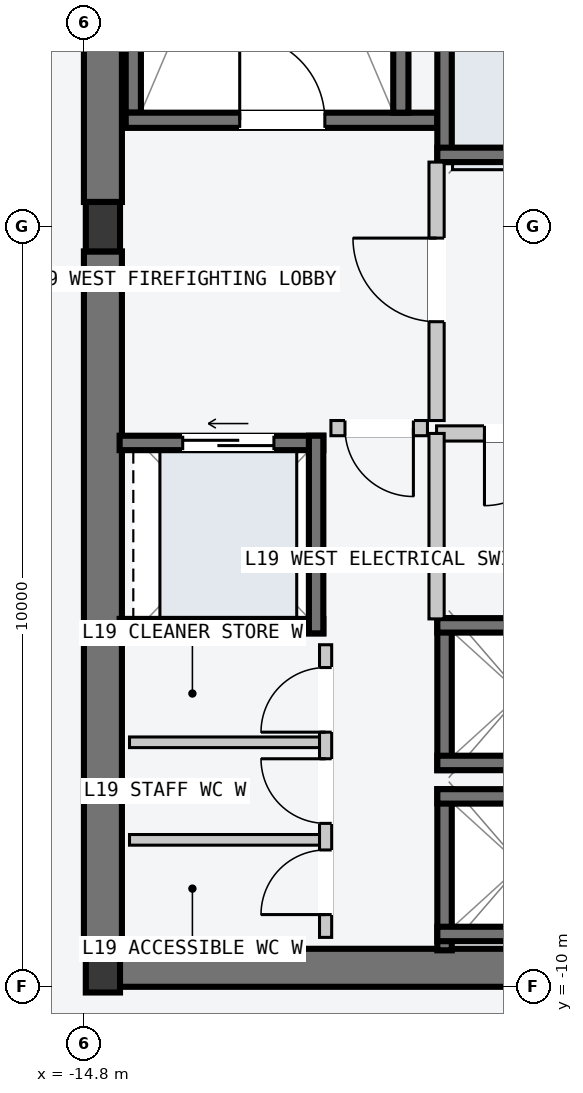
"""IFC4 building model, lengths in metres.
Left out: names, types, materials, properties, quantities, classifications, styles, units other than length and angle.
Written with IfcOpenShell. Run it as: python <this file> out.ifc"""

import sys

from ifc_helpers import new_model, si_unit, direction, frame, frame_2d, origin, origin_2d, place, context, subcontext, project, spatial, rectangle, i_section, extrude, element, fill, save


model = new_model("IFC4")
c1 = context("Model", 3, precision=1e-05, world=origin(), true_north=direction((0.0, 1.0)))
c2 = subcontext(c1, "Body", "Model", "MODEL_VIEW")
j1 = project(units=[si_unit("LENGTHUNIT", "METRE"), si_unit("PLANEANGLEUNIT", "RADIAN")], contexts=[c1])
p1 = place(None, origin())
s1 = spatial("IfcSite", under=j1, at=p1, CompositionType="ELEMENT")
p2 = place(p1, origin())
s2 = spatial("IfcBuilding", under=s1, at=p2, CompositionType="ELEMENT")
p3 = place(p2, frame((0.0, 0.0, 74.4)))
s3 = spatial("IfcBuildingStorey", under=s2, at=p3, CompositionType="ELEMENT", Elevation=74.4)
p4 = place(p3, frame((-14.53, -9.75, -0.2), z_axis=(0.0, 0.0, 1.0), x_axis=(1.0, 0.0, 0.0)))
e1 = element("IfcWall", 1, at=p4, inside=s3, PredefinedType="SHEAR", context=c2, shape_type="SweptSolid", body=[
    extrude(rectangle(XDim=6.46, YDim=0.5, at=frame_2d((3.23, 0.0))), origin(), (0.0, 0.0, 1.0), 3.6),
])
for number, where, z_axis, x_axis in (
    (2, (-14.55, -9.425, -0.2), (0.0, 0.0, 1.0), (0.0, 1.0, 0.0)),
    (3, (-14.55, 0.325, -0.2), (0.0, 0.0, 1.0), (0.0, 1.0, 0.0)),
):
    element("IfcWall", number, at=place(p3, frame(where, z_axis=z_axis, x_axis=x_axis)), inside=s3, PredefinedType="SHEAR", context=c2, shape_type="SweptSolid", body=[
        extrude(rectangle(XDim=9.1, YDim=0.5, at=frame_2d((4.55, 0.0))), origin(), (0.0, 0.0, 1.0), 3.6),
    ])
p5 = place(p3, frame((-14.15, 1.5, -0.2), z_axis=(0.0, 0.0, 1.0), x_axis=(0.0, 1.0, 0.0)))
e4 = element("IfcWall", 4, at=p5, inside=s3, PredefinedType="SOLIDWALL", context=c2, shape_type="SweptSolid", body=[
    extrude(rectangle(XDim=7.8, YDim=0.2, at=frame_2d((3.9, 0.0))), origin(), (0.0, 0.0, 1.0), 3.6),
])
p6 = place(p3, frame((-14.25, 1.4, -0.2), z_axis=(0.0, 0.0, 1.0), x_axis=(1.0, 0.0, 0.0)))
e5 = element("IfcWall", 5, at=p6, inside=s3, PredefinedType="SOLIDWALL", context=c2, shape_type="SweptSolid", body=[
    extrude(rectangle(XDim=4.1, YDim=0.2, at=frame_2d((2.05, 0.0))), origin(), (0.0, 0.0, 1.0), 3.6),
])
p7 = place(p6, frame((1.5, 0.0, 0.2)))
e6 = element("IfcOpeningElement", 6, at=p7, cuts=e5, PredefinedType="OPENING", context=c2, shape_type="SweptSolid", body=[
    extrude(rectangle(XDim=1.12, YDim=2.18, at=frame_2d((0.56, 1.09))), frame((0.0, 0.11, 0.0), z_axis=(0.0, -1.0, 0.0), x_axis=(1.0, 0.0, 0.0)), (0.0, 0.0, 1.0), 0.22),
])
p8 = place(p3, frame((-10.63, 1.5, -0.2), z_axis=(0.0, 0.0, 1.0), x_axis=(0.0, 1.0, 0.0)))
e7 = element("IfcWall", 7, at=p8, inside=s3, PredefinedType="SOLIDWALL", context=c2, shape_type="SweptSolid", body=[
    extrude(rectangle(XDim=7.8, YDim=0.2, at=frame_2d((3.9, 0.0))), origin(), (0.0, 0.0, 1.0), 3.6),
])
for number, where, z_axis, x_axis in (
    (8, (-14.55, -9.75, 0.0), (0.0, 0.0, 1.0), (1.0, 0.0, 0.0)),
    (9, (-14.55, 0.0, 0.0), (0.0, 0.0, 1.0), (1.0, 0.0, 0.0)),
):
    element("IfcColumn", number, at=place(p3, frame(where, z_axis=z_axis, x_axis=x_axis)), inside=s3, PredefinedType="COLUMN", context=c2, shape_type="SweptSolid", body=[
        extrude(i_section(OverallWidth=0.45, OverallDepth=0.65, WebThickness=0.025, FlangeThickness=0.04, at=origin_2d()), origin(), (0.0, 0.0, 1.0), 3.6),
    ])
p9 = place(p3, frame((-10.055, 0.85, -0.2), z_axis=(0.0, 0.0, 1.0), x_axis=(0.0, 1.0, 0.0)))
e10 = element("IfcWall", 10, at=p9, inside=s3, PredefinedType="SOLIDWALL", context=c2, shape_type="SweptSolid", body=[
    extrude(rectangle(XDim=1.9, YDim=0.19, at=frame_2d((0.95, 0.0))), origin(), (0.0, 0.0, 1.0), 3.6),
])
p10 = place(p3, frame((-10.15, 0.945, -0.2), z_axis=(0.0, 0.0, 1.0), x_axis=(1.0, 0.0, 0.0)))
e11 = element("IfcWall", 11, at=p10, inside=s3, PredefinedType="SOLIDWALL", context=c2, shape_type="SweptSolid", body=[
    extrude(rectangle(XDim=2.2, YDim=0.19, at=frame_2d((1.1, 0.0))), origin(), (0.0, 0.0, 1.0), 3.6),
])
p11 = place(p3, frame((-10.055, -9.52, -0.2), z_axis=(0.0, 0.0, 1.0), x_axis=(0.0, 1.0, 0.0)))
e12 = element("IfcWall", 12, at=p11, inside=s3, PredefinedType="SOLIDWALL", context=c2, shape_type="SweptSolid", body=[
    extrude(rectangle(XDim=2.12, YDim=0.19, at=frame_2d((1.06, 0.0))), origin(), (0.0, 0.0, 1.0), 3.6),
])
for number, where, z_axis, x_axis in (
    (13, (-10.15, -7.495, -0.2), (0.0, 0.0, 1.0), (1.0, 0.0, 0.0)),
    (14, (-10.15, -9.305, -0.2), (0.0, 0.0, 1.0), (1.0, 0.0, 0.0)),
):
    element("IfcWall", number, at=place(p3, frame(where, z_axis=z_axis, x_axis=x_axis)), inside=s3, PredefinedType="SOLIDWALL", context=c2, shape_type="SweptSolid", body=[
        extrude(rectangle(XDim=2.2, YDim=0.19, at=frame_2d((1.1, 0.0))), origin(), (0.0, 0.0, 1.0), 3.6),
    ])
p12 = place(p3, frame((-10.055, -7.15, -0.2), z_axis=(0.0, 0.0, 1.0), x_axis=(0.0, 1.0, 0.0)))
e15 = element("IfcWall", 15, at=p12, inside=s3, PredefinedType="SOLIDWALL", context=c2, shape_type="SweptSolid", body=[
    extrude(rectangle(XDim=2.0, YDim=0.19, at=frame_2d((1.0, 0.0))), origin(), (0.0, 0.0, 1.0), 3.6),
])
for number, where, z_axis, x_axis in (
    (16, (-10.15, -5.245, -0.2), (0.0, 0.0, 1.0), (1.0, 0.0, 0.0)),
    (17, (-10.15, -7.055, -0.2), (0.0, 0.0, 1.0), (1.0, 0.0, 0.0)),
):
    element("IfcWall", number, at=place(p3, frame(where, z_axis=z_axis, x_axis=x_axis)), inside=s3, PredefinedType="SOLIDWALL", context=c2, shape_type="SweptSolid", body=[
        extrude(rectangle(XDim=2.2, YDim=0.19, at=frame_2d((1.1, 0.0))), origin(), (0.0, 0.0, 1.0), 3.6),
    ])
p13 = place(p3, frame((-14.33, -2.845, -0.2), z_axis=(0.0, 0.0, 1.0), x_axis=(1.0, 0.0, 0.0)))
e18 = element("IfcWall", 18, at=p13, inside=s3, PredefinedType="SOLIDWALL", context=c2, shape_type="SweptSolid", body=[
    extrude(rectangle(XDim=2.68, YDim=0.19, at=frame_2d((1.34, 0.0))), origin(), (0.0, 0.0, 1.0), 3.6),
])
p14 = place(p13, frame((0.83, 0.0, 0.2)))
e19 = element("IfcOpeningElement", 19, at=p14, cuts=e18, PredefinedType="OPENING", context=c2, shape_type="SweptSolid", body=[
    extrude(rectangle(XDim=1.2, YDim=2.2, at=frame_2d((0.6, 1.1))), frame((0.0, 0.105, 0.0), z_axis=(0.0, -1.0, 0.0), x_axis=(1.0, 0.0, 0.0)), (0.0, 0.0, 1.0), 0.21),
])
p15 = place(p3, frame((-14.33, -5.255, -0.2), z_axis=(0.0, 0.0, 1.0), x_axis=(1.0, 0.0, 0.0)))
e20 = element("IfcWall", 20, at=p15, inside=s3, PredefinedType="SOLIDWALL", context=c2, shape_type="SweptSolid", body=[
    extrude(rectangle(XDim=2.68, YDim=0.19, at=frame_2d((1.34, 0.0))), origin(), (0.0, 0.0, 1.0), 3.6),
])
p16 = place(p3, frame((-11.745, -5.35, -0.2), z_axis=(0.0, 0.0, 1.0), x_axis=(0.0, 1.0, 0.0)))
e21 = element("IfcWall", 21, at=p16, inside=s3, PredefinedType="SOLIDWALL", context=c2, shape_type="SweptSolid", body=[
    extrude(rectangle(XDim=2.6, YDim=0.19, at=frame_2d((1.3, 0.0))), origin(), (0.0, 0.0, 1.0), 3.6),
])
p17 = place(p3, frame((-10.16, -2.55, 0.0), z_axis=(0.0, 0.0, 1.0), x_axis=(0.0, 1.0, 0.0)))
e22 = element("IfcWall", 22, at=p17, inside=s3, PredefinedType="PARTITIONING", context=c2, shape_type="SweptSolid", body=[
    extrude(rectangle(XDim=3.4, YDim=0.2, at=frame_2d((1.7, 0.0))), origin(), (0.0, 0.0, 1.0), 3.4),
])
p18 = place(p17, frame((1.3, 0.0, 0.0)))
e23 = element("IfcOpeningElement", 23, at=p18, cuts=e22, PredefinedType="OPENING", context=c2, shape_type="SweptSolid", body=[
    extrude(rectangle(XDim=1.1, YDim=2.15, at=frame_2d((0.55, 1.075))), frame((0.0, 0.11, 0.0), z_axis=(0.0, -1.0, 0.0), x_axis=(1.0, 0.0, 0.0)), (0.0, 0.0, 1.0), 0.22),
])
p19 = place(p3, frame((-10.28, -2.65, 0.0), z_axis=(0.0, 0.0, 1.0), x_axis=(-1.0, 0.0, 0.0)))
e24 = element("IfcWall", 24, at=p19, inside=s3, PredefinedType="PARTITIONING", context=c2, shape_type="SweptSolid", body=[
    extrude(rectangle(XDim=1.27, YDim=0.2, at=frame_2d((0.635, 0.0))), origin(), (0.0, 0.0, 1.0), 3.4),
])
p20 = place(p19, frame((0.185, 0.0, 0.0)))
e25 = element("IfcOpeningElement", 25, at=p20, cuts=e24, PredefinedType="OPENING", context=c2, shape_type="SweptSolid", body=[
    extrude(rectangle(XDim=0.9, YDim=2.15, at=frame_2d((0.45, 1.075))), frame((0.0, 0.11, 0.0), z_axis=(0.0, -1.0, 0.0), x_axis=(1.0, 0.0, 0.0)), (0.0, 0.0, 1.0), 0.22),
])
p21 = place(p3, frame((-7.96, -2.72, 0.0), z_axis=(0.0, 0.0, 1.0), x_axis=(-1.0, 0.0, 0.0)))
e26 = element("IfcWall", 26, at=p21, inside=s3, PredefinedType="PARTITIONING", context=c2, shape_type="SweptSolid", body=[
    extrude(rectangle(XDim=2.2, YDim=0.2, at=frame_2d((1.1, 0.0))), origin(), (0.0, 0.0, 1.0), 3.4),
])
p22 = place(p21, frame((0.62, 0.0, 0.0)))
e27 = element("IfcOpeningElement", 27, at=p22, cuts=e26, PredefinedType="OPENING", context=c2, shape_type="SweptSolid", body=[
    extrude(rectangle(XDim=0.95, YDim=2.1, at=frame_2d((0.475, 1.05))), frame((0.0, 0.11, 0.0), z_axis=(0.0, -1.0, 0.0), x_axis=(1.0, 0.0, 0.0)), (0.0, 0.0, 1.0), 0.22),
])
p23 = place(p3, frame((-10.16, -5.16, 0.0), z_axis=(0.0, 0.0, 1.0), x_axis=(0.0, 1.0, 0.0)))
e28 = element("IfcWall", 28, at=p23, inside=s3, PredefinedType="PARTITIONING", context=c2, shape_type="SweptSolid", body=[
    extrude(rectangle(XDim=2.44, YDim=0.2, at=frame_2d((1.22, 0.0))), origin(), (0.0, 0.0, 1.0), 3.4),
])
for number, where, z_axis, x_axis in (
    (29, (-11.7, -8.067, 0.0), (0.0, 0.0, 1.0), (-1.0, 0.0, 0.0)),
    (30, (-11.7, -6.783, 0.0), (0.0, 0.0, 1.0), (-1.0, 0.0, 0.0)),
):
    element("IfcWall", number, at=place(p3, frame(where, z_axis=z_axis, x_axis=x_axis)), inside=s3, PredefinedType="PARTITIONING", context=c2, shape_type="SweptSolid", body=[
        extrude(rectangle(XDim=2.5, YDim=0.14, at=frame_2d((1.25, 0.0))), origin(), (0.0, 0.0, 1.0), 3.4),
    ])
p24 = place(p3, frame((-11.62, -9.35, 0.0), z_axis=(0.0, 0.0, 1.0), x_axis=(0.0, 1.0, 0.0)))
e31 = element("IfcWall", 31, at=p24, inside=s3, PredefinedType="PARTITIONING", context=c2, shape_type="SweptSolid", body=[
    extrude(rectangle(XDim=3.85, YDim=0.16, at=frame_2d((1.925, 0.0))), origin(), (0.0, 0.0, 1.0), 3.4),
])
p25 = place(p24, frame((0.3, 0.0, 0.0)))
e32 = element("IfcOpeningElement", 32, at=p25, cuts=e31, PredefinedType="OPENING", context=c2, shape_type="SweptSolid", body=[
    extrude(rectangle(XDim=0.85, YDim=2.12, at=frame_2d((0.425, 1.06))), frame((0.0, 0.09, 0.0), z_axis=(0.0, -1.0, 0.0), x_axis=(1.0, 0.0, 0.0)), (0.0, 0.0, 1.0), 0.18),
])
p26 = place(p24, frame((1.5, 0.0, 0.0)))
e33 = element("IfcOpeningElement", 33, at=p26, cuts=e31, PredefinedType="OPENING", context=c2, shape_type="SweptSolid", body=[
    extrude(rectangle(XDim=0.85, YDim=2.12, at=frame_2d((0.425, 1.06))), frame((0.0, 0.09, 0.0), z_axis=(0.0, -1.0, 0.0), x_axis=(1.0, 0.0, 0.0)), (0.0, 0.0, 1.0), 0.18),
])
p27 = place(p24, frame((2.7, 0.0, 0.0)))
e34 = element("IfcOpeningElement", 34, at=p27, cuts=e31, PredefinedType="OPENING", context=c2, shape_type="SweptSolid", body=[
    extrude(rectangle(XDim=0.85, YDim=2.12, at=frame_2d((0.425, 1.06))), frame((0.0, 0.09, 0.0), z_axis=(0.0, -1.0, 0.0), x_axis=(1.0, 0.0, 0.0)), (0.0, 0.0, 1.0), 0.18),
])
p28 = place(p7, origin())
e35 = element("IfcDoor", 35, at=p28, inside=s3, OperationType="SINGLE_SWING_LEFT", PredefinedType="DOOR", context=c2, shape_type="SweptSolid", body=[
    extrude(rectangle(XDim=1.12, YDim=2.18, at=frame_2d((0.56, 1.09))), frame((0.0, 0.025, 0.0), z_axis=(0.0, -1.0, 0.0), x_axis=(1.0, 0.0, 0.0)), (0.0, 0.0, 1.0), 0.05),
])
fill(e6, e35)
p29 = place(p14, origin())
e36 = element("IfcDoor", 36, at=p29, inside=s3, OperationType="SLIDING_TO_LEFT", PredefinedType="DOOR", context=c2, shape_type="SweptSolid", body=[
    extrude(rectangle(XDim=1.2, YDim=2.2, at=frame_2d((0.6, 1.1))), frame((0.0, 0.025, 0.0), z_axis=(0.0, -1.0, 0.0), x_axis=(1.0, 0.0, 0.0)), (0.0, 0.0, 1.0), 0.05),
])
fill(e19, e36)
p30 = place(p18, origin())
e37 = element("IfcDoor", 37, at=p30, inside=s3, OperationType="SINGLE_SWING_RIGHT", PredefinedType="DOOR", context=c2, shape_type="SweptSolid", body=[
    extrude(rectangle(XDim=1.1, YDim=2.15, at=frame_2d((0.55, 1.075))), frame((0.0, 0.025, 0.0), z_axis=(0.0, -1.0, 0.0), x_axis=(1.0, 0.0, 0.0)), (0.0, 0.0, 1.0), 0.05),
])
fill(e23, e37)
p31 = place(p20, origin())
e38 = element("IfcDoor", 38, at=p31, inside=s3, OperationType="SINGLE_SWING_LEFT", PredefinedType="DOOR", context=c2, shape_type="SweptSolid", body=[
    extrude(rectangle(XDim=0.9, YDim=2.15, at=frame_2d((0.45, 1.075))), frame((0.0, 0.025, 0.0), z_axis=(0.0, -1.0, 0.0), x_axis=(1.0, 0.0, 0.0)), (0.0, 0.0, 1.0), 0.05),
])
fill(e25, e38)
p32 = place(p22, origin())
e39 = element("IfcDoor", 39, at=p32, inside=s3, OperationType="SINGLE_SWING_RIGHT", PredefinedType="DOOR", context=c2, shape_type="SweptSolid", body=[
    extrude(rectangle(XDim=0.95, YDim=2.1, at=frame_2d((0.475, 1.05))), frame((0.0, 0.025, 0.0), z_axis=(0.0, -1.0, 0.0), x_axis=(1.0, 0.0, 0.0)), (0.0, 0.0, 1.0), 0.05),
])
fill(e27, e39)
p33 = place(p25, origin())
e40 = element("IfcDoor", 40, at=p33, inside=s3, OperationType="SINGLE_SWING_LEFT", PredefinedType="DOOR", context=c2, shape_type="SweptSolid", body=[
    extrude(rectangle(XDim=0.85, YDim=2.12, at=frame_2d((0.425, 1.06))), frame((0.0, 0.025, 0.0), z_axis=(0.0, -1.0, 0.0), x_axis=(1.0, 0.0, 0.0)), (0.0, 0.0, 1.0), 0.05),
])
fill(e32, e40)
p34 = place(p26, origin())
e41 = element("IfcDoor", 41, at=p34, inside=s3, OperationType="SINGLE_SWING_RIGHT", PredefinedType="DOOR", context=c2, shape_type="SweptSolid", body=[
    extrude(rectangle(XDim=0.85, YDim=2.12, at=frame_2d((0.425, 1.06))), frame((0.0, 0.025, 0.0), z_axis=(0.0, -1.0, 0.0), x_axis=(1.0, 0.0, 0.0)), (0.0, 0.0, 1.0), 0.05),
])
fill(e33, e41)
p35 = place(p27, origin())
e42 = element("IfcDoor", 42, at=p35, inside=s3, OperationType="SINGLE_SWING_LEFT", PredefinedType="DOOR", context=c2, shape_type="SweptSolid", body=[
    extrude(rectangle(XDim=0.85, YDim=2.12, at=frame_2d((0.425, 1.06))), frame((0.0, 0.025, 0.0), z_axis=(0.0, -1.0, 0.0), x_axis=(1.0, 0.0, 0.0)), (0.0, 0.0, 1.0), 0.05),
])
fill(e34, e42)
save(model, sys.argv[1])
